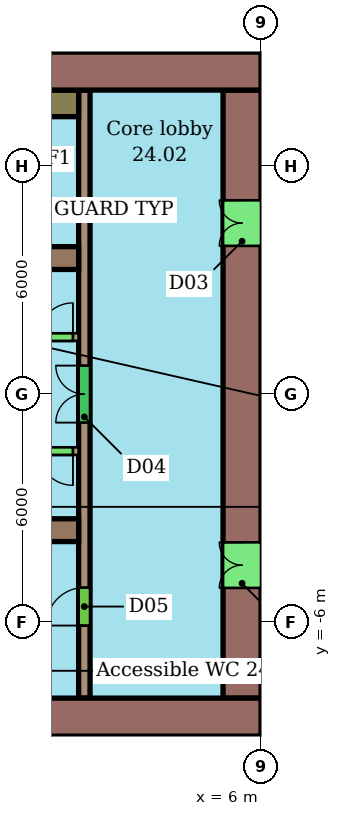
"""IFC4 building model, lengths in metres.
Left out: names, types, materials, properties, quantities, classifications, styles, units other than length and angle.
Written with IfcOpenShell. Run it as: python <this file> out.ifc"""

import sys

from ifc_helpers import new_model, si_unit, direction, frame, frame_2d, origin, place, context, subcontext, project, spatial, rectangle, extrude, element, fill, save


model = new_model("IFC4")
c1 = context("Model", 3, precision=1e-05, world=origin(), true_north=direction((0.0, 1.0)))
c2 = subcontext(c1, "Body", "Model", "MODEL_VIEW")
j1 = project(units=[si_unit("LENGTHUNIT", "METRE"), si_unit("PLANEANGLEUNIT", "RADIAN")], contexts=[c1])
p1 = place(None, origin())
s1 = spatial("IfcSite", under=j1, at=p1, CompositionType="ELEMENT")
p2 = place(p1, origin())
s2 = spatial("IfcBuilding", under=s1, at=p2, CompositionType="ELEMENT")
p3 = place(p2, frame((0.0, 0.0, 106.6)))
s3 = spatial("IfcBuildingStorey", under=s2, at=p3, CompositionType="ELEMENT", Elevation=106.6)
p4 = place(p3, frame((6.0, 8.5, 0.0), z_axis=(0.0, 0.0, 1.0), x_axis=(-1.0, 0.0, 0.0)))
e1 = element("IfcWall", 1, at=p4, inside=s3, PredefinedType="SHEAR", context=c2, shape_type="SweptSolid", body=[
    extrude(rectangle(XDim=12.0, YDim=1.0, at=frame_2d((6.0, 0.0))), origin(), (0.0, 0.0, 1.0), 3.3),
])
p5 = place(p4, frame((5.6, 0.0, 0.0)))
e2 = element("IfcOpeningElement", 2, at=p5, cuts=e1, PredefinedType="OPENING", context=c2, shape_type="SweptSolid", body=[
    extrude(rectangle(XDim=1.2, YDim=2.1, at=frame_2d((0.6, 1.05))), frame((0.0, 0.51, 0.0), z_axis=(0.0, -1.0, 0.0), x_axis=(1.0, 0.0, 0.0)), (0.0, 0.0, 1.0), 1.02),
])
p6 = place(p3, frame((-18.0, -8.5, 0.0), z_axis=(0.0, 0.0, 1.0), x_axis=(1.0, 0.0, 0.0)))
e3 = element("IfcWall", 3, at=p6, inside=s3, PredefinedType="SHEAR", context=c2, shape_type="SweptSolid", body=[
    extrude(rectangle(XDim=24.0, YDim=1.0, at=frame_2d((12.0, 0.0))), origin(), (0.0, 0.0, 1.0), 3.3),
])
p7 = place(p6, frame((6.0, 0.0, 0.0)))
e4 = element("IfcOpeningElement", 4, at=p7, cuts=e3, PredefinedType="OPENING", context=c2, shape_type="SweptSolid", body=[
    extrude(rectangle(XDim=1.2, YDim=2.1, at=frame_2d((0.6, 1.05))), frame((0.0, 0.51, 0.0), z_axis=(0.0, -1.0, 0.0), x_axis=(1.0, 0.0, 0.0)), (0.0, 0.0, 1.0), 1.02),
])
p8 = place(p3, frame((5.5, -8.0, 0.0), z_axis=(0.0, 0.0, 1.0), x_axis=(0.0, 1.0, 0.0)))
e5 = element("IfcWall", 5, at=p8, inside=s3, PredefinedType="SHEAR", context=c2, shape_type="SweptSolid", body=[
    extrude(rectangle(XDim=16.0, YDim=1.0, at=frame_2d((8.0, 0.0))), origin(), (0.0, 0.0, 1.0), 3.3),
])
p9 = place(p8, frame((2.9, 0.0, 0.0)))
e6 = element("IfcOpeningElement", 6, at=p9, cuts=e5, PredefinedType="OPENING", context=c2, shape_type="SweptSolid", body=[
    extrude(rectangle(XDim=1.2, YDim=2.1, at=frame_2d((0.6, 1.05))), frame((0.0, 0.51, 0.0), z_axis=(0.0, -1.0, 0.0), x_axis=(1.0, 0.0, 0.0)), (0.0, 0.0, 1.0), 1.02),
])
p10 = place(p8, frame((11.9, 0.0, 0.0)))
e7 = element("IfcOpeningElement", 7, at=p10, cuts=e5, PredefinedType="OPENING", context=c2, shape_type="SweptSolid", body=[
    extrude(rectangle(XDim=1.2, YDim=2.1, at=frame_2d((0.6, 1.05))), frame((0.0, 0.51, 0.0), z_axis=(0.0, -1.0, 0.0), x_axis=(1.0, 0.0, 0.0)), (0.0, 0.0, 1.0), 1.02),
])
for number, where, z_axis, x_axis in (
    (8, (-6.0, 3.58, 0.0), (0.0, 0.0, 1.0), (1.0, 0.0, 0.0)),
    (9, (-6.0, -3.58, 0.0), (0.0, 0.0, 1.0), (1.0, 0.0, 0.0)),
):
    element("IfcWall", number, at=place(p3, frame(where, z_axis=z_axis, x_axis=x_axis)), inside=s3, PredefinedType="SHEAR", context=c2, shape_type="SweptSolid", body=[
        extrude(rectangle(XDim=7.2, YDim=0.6, at=frame_2d((3.6, 0.0))), origin(), (0.0, 0.0, 1.0), 3.3),
    ])
p11 = place(p3, frame((1.35, -8.0, 0.0), z_axis=(0.0, 0.0, 1.0), x_axis=(0.0, 1.0, 0.0)))
e10 = element("IfcWall", 10, at=p11, inside=s3, PredefinedType="SHEAR", context=c2, shape_type="SweptSolid", body=[
    extrude(rectangle(XDim=16.0, YDim=0.3, at=frame_2d((8.0, 0.0))), origin(), (0.0, 0.0, 1.0), 3.3),
])
p12 = place(p11, frame((1.91, 0.0, 0.0)))
e11 = element("IfcOpeningElement", 11, at=p12, cuts=e10, PredefinedType="OPENING", context=c2, shape_type="SweptSolid", body=[
    extrude(rectangle(XDim=1.0, YDim=2.1, at=frame_2d((0.5, 1.05))), frame((0.0, 0.16, 0.0), z_axis=(0.0, -1.0, 0.0), x_axis=(1.0, 0.0, 0.0)), (0.0, 0.0, 1.0), 0.32),
])
p13 = place(p11, frame((7.25, 0.0, 0.0)))
e12 = element("IfcOpeningElement", 12, at=p13, cuts=e10, PredefinedType="OPENING", context=c2, shape_type="SweptSolid", body=[
    extrude(rectangle(XDim=1.5, YDim=2.1, at=frame_2d((0.75, 1.05))), frame((0.0, 0.16, 0.0), z_axis=(0.0, -1.0, 0.0), x_axis=(1.0, 0.0, 0.0)), (0.0, 0.0, 1.0), 0.32),
])
p14 = place(p3, frame((-13.2, 1.5, 0.0), z_axis=(0.0, 0.0, 1.0), x_axis=(1.0, 0.0, 0.0)))
e13 = element("IfcWall", 13, at=p14, inside=s3, PredefinedType="SHEAR", context=c2, shape_type="SweptSolid", body=[
    extrude(rectangle(XDim=14.4, YDim=0.2, at=frame_2d((7.2, 0.0))), origin(), (0.0, 0.0, 1.0), 3.3),
])
p15 = place(p14, frame((0.546, 0.0, 0.0)))
e14 = element("IfcOpeningElement", 14, at=p15, cuts=e13, PredefinedType="OPENING", context=c2, shape_type="SweptSolid", body=[
    extrude(rectangle(XDim=1.1, YDim=2.1, at=frame_2d((0.55, 1.05))), frame((0.0, 0.11, 0.0), z_axis=(0.0, -1.0, 0.0), x_axis=(1.0, 0.0, 0.0)), (0.0, 0.0, 1.0), 0.22),
])
p16 = place(p14, frame((2.988, 0.0, 0.0)))
e15 = element("IfcOpeningElement", 15, at=p16, cuts=e13, PredefinedType="OPENING", context=c2, shape_type="SweptSolid", body=[
    extrude(rectangle(XDim=1.1, YDim=2.1, at=frame_2d((0.55, 1.05))), frame((0.0, 0.11, 0.0), z_axis=(0.0, -1.0, 0.0), x_axis=(1.0, 0.0, 0.0)), (0.0, 0.0, 1.0), 0.22),
])
p17 = place(p14, frame((5.429, 0.0, 0.0)))
e16 = element("IfcOpeningElement", 16, at=p17, cuts=e13, PredefinedType="OPENING", context=c2, shape_type="SweptSolid", body=[
    extrude(rectangle(XDim=1.1, YDim=2.1, at=frame_2d((0.55, 1.05))), frame((0.0, 0.11, 0.0), z_axis=(0.0, -1.0, 0.0), x_axis=(1.0, 0.0, 0.0)), (0.0, 0.0, 1.0), 0.22),
])
p18 = place(p14, frame((7.871, 0.0, 0.0)))
e17 = element("IfcOpeningElement", 17, at=p18, cuts=e13, PredefinedType="OPENING", context=c2, shape_type="SweptSolid", body=[
    extrude(rectangle(XDim=1.1, YDim=2.1, at=frame_2d((0.55, 1.05))), frame((0.0, 0.11, 0.0), z_axis=(0.0, -1.0, 0.0), x_axis=(1.0, 0.0, 0.0)), (0.0, 0.0, 1.0), 0.22),
])
p19 = place(p14, frame((13.35, 0.0, 0.0)))
e18 = element("IfcOpeningElement", 18, at=p19, cuts=e13, PredefinedType="OPENING", context=c2, shape_type="SweptSolid", body=[
    extrude(rectangle(XDim=0.9, YDim=2.1, at=frame_2d((0.45, 1.05))), frame((0.0, 0.11, 0.0), z_axis=(0.0, -1.0, 0.0), x_axis=(1.0, 0.0, 0.0)), (0.0, 0.0, 1.0), 0.22),
])
p20 = place(p3, frame((1.2, -1.5, 0.0), z_axis=(0.0, 0.0, 1.0), x_axis=(-1.0, 0.0, 0.0)))
e19 = element("IfcWall", 19, at=p20, inside=s3, PredefinedType="SHEAR", context=c2, shape_type="SweptSolid", body=[
    extrude(rectangle(XDim=14.4, YDim=0.2, at=frame_2d((7.2, 0.0))), origin(), (0.0, 0.0, 1.0), 3.3),
])
p21 = place(p20, frame((7.821, 0.0, 0.0)))
e20 = element("IfcOpeningElement", 20, at=p21, cuts=e19, PredefinedType="OPENING", context=c2, shape_type="SweptSolid", body=[
    extrude(rectangle(XDim=1.2, YDim=2.1, at=frame_2d((0.6, 1.05))), frame((0.0, 0.11, 0.0), z_axis=(0.0, -1.0, 0.0), x_axis=(1.0, 0.0, 0.0)), (0.0, 0.0, 1.0), 0.22),
])
p22 = place(p20, frame((0.15, 0.0, 0.0)))
e21 = element("IfcOpeningElement", 21, at=p22, cuts=e19, PredefinedType="OPENING", context=c2, shape_type="SweptSolid", body=[
    extrude(rectangle(XDim=0.9, YDim=2.1, at=frame_2d((0.45, 1.05))), frame((0.0, 0.11, 0.0), z_axis=(0.0, -1.0, 0.0), x_axis=(1.0, 0.0, 0.0)), (0.0, 0.0, 1.0), 0.22),
])
p23 = place(p3, frame((0.4, 7.65, 0.0), z_axis=(0.0, 0.0, 1.0), x_axis=(1.0, 0.0, 0.0)))
e22 = element("IfcWall", 22, at=p23, inside=s3, PredefinedType="SHEAR", context=c2, shape_type="SweptSolid", body=[
    extrude(rectangle(XDim=0.8, YDim=0.7, at=frame_2d((0.4, 0.0))), origin(), (0.0, 0.0, 1.0), 3.3),
])
p24 = place(p9, origin())
e23 = element("IfcDoor", 23, at=p24, inside=s3, OperationType="DOUBLE_DOOR_SINGLE_SWING", PredefinedType="NOTDEFINED", context=c2, shape_type="SweptSolid", body=[
    extrude(rectangle(XDim=1.2, YDim=2.1, at=frame_2d((0.6, 1.05))), frame((0.0, 0.025, 0.0), z_axis=(0.0, -1.0, 0.0), x_axis=(1.0, 0.0, 0.0)), (0.0, 0.0, 1.0), 0.05),
])
fill(e6, e23)
p25 = place(p10, origin())
e24 = element("IfcDoor", 24, at=p25, inside=s3, OperationType="DOUBLE_DOOR_SINGLE_SWING", PredefinedType="NOTDEFINED", context=c2, shape_type="SweptSolid", body=[
    extrude(rectangle(XDim=1.2, YDim=2.1, at=frame_2d((0.6, 1.05))), frame((0.0, 0.025, 0.0), z_axis=(0.0, -1.0, 0.0), x_axis=(1.0, 0.0, 0.0)), (0.0, 0.0, 1.0), 0.05),
])
fill(e7, e24)
p26 = place(p12, origin())
e25 = element("IfcDoor", 25, at=p26, inside=s3, OperationType="SINGLE_SWING_LEFT", PredefinedType="NOTDEFINED", context=c2, shape_type="SweptSolid", body=[
    extrude(rectangle(XDim=1.0, YDim=2.1, at=frame_2d((0.5, 1.05))), frame((0.0, 0.025, 0.0), z_axis=(0.0, -1.0, 0.0), x_axis=(1.0, 0.0, 0.0)), (0.0, 0.0, 1.0), 0.05),
])
fill(e11, e25)
p27 = place(p13, origin())
e26 = element("IfcDoor", 26, at=p27, inside=s3, OperationType="DOUBLE_DOOR_SINGLE_SWING", PredefinedType="NOTDEFINED", context=c2, shape_type="SweptSolid", body=[
    extrude(rectangle(XDim=1.5, YDim=2.1, at=frame_2d((0.75, 1.05))), frame((0.0, 0.025, 0.0), z_axis=(0.0, -1.0, 0.0), x_axis=(1.0, 0.0, 0.0)), (0.0, 0.0, 1.0), 0.05),
])
fill(e12, e26)
p28 = place(p19, origin())
e27 = element("IfcDoor", 27, at=p28, inside=s3, OperationType="SINGLE_SWING_RIGHT", PredefinedType="NOTDEFINED", context=c2, shape_type="SweptSolid", body=[
    extrude(rectangle(XDim=0.9, YDim=2.1, at=frame_2d((0.45, 1.05))), frame((0.0, 0.025, 0.0), z_axis=(0.0, -1.0, 0.0), x_axis=(1.0, 0.0, 0.0)), (0.0, 0.0, 1.0), 0.05),
])
fill(e18, e27)
p29 = place(p22, origin())
e28 = element("IfcDoor", 28, at=p29, inside=s3, OperationType="SINGLE_SWING_LEFT", PredefinedType="NOTDEFINED", context=c2, shape_type="SweptSolid", body=[
    extrude(rectangle(XDim=0.9, YDim=2.1, at=frame_2d((0.45, 1.05))), frame((0.0, 0.025, 0.0), z_axis=(0.0, -1.0, 0.0), x_axis=(1.0, 0.0, 0.0)), (0.0, 0.0, 1.0), 0.05),
])
fill(e21, e28)
save(model, sys.argv[1])
